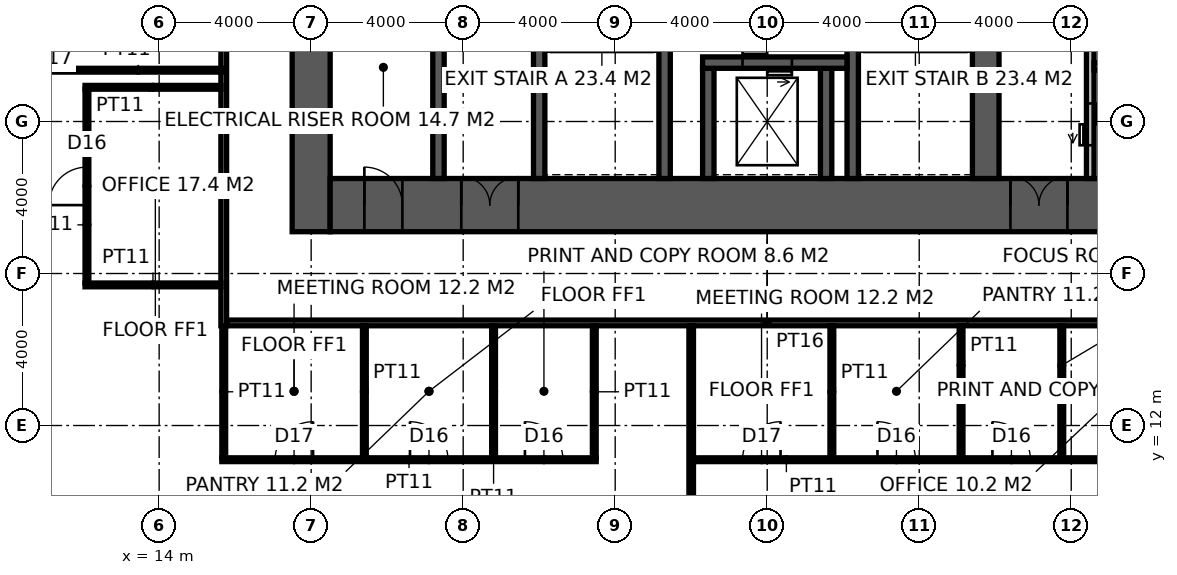
"""IFC4 building model, lengths in metres.
Left out: names, types, materials, properties, quantities, classifications, styles, units other than length and angle.
Written with IfcOpenShell. Run it as: python <this file> out.ifc"""

import sys

from ifc_helpers import new_model, si_unit, direction, frame, frame_2d, origin, place, context, subcontext, project, spatial, rectangle, extrude, element, fill, save


model = new_model("IFC4")
c1 = context("Model", 3, precision=1e-05, world=origin(), true_north=direction((0.0, 1.0)))
c2 = subcontext(c1, "Body", "Model", "MODEL_VIEW")
j1 = project(units=[si_unit("LENGTHUNIT", "METRE"), si_unit("PLANEANGLEUNIT", "RADIAN")], contexts=[c1])
p1 = place(None, origin())
s1 = spatial("IfcSite", under=j1, at=p1, CompositionType="ELEMENT")
p2 = place(p1, origin())
s2 = spatial("IfcBuilding", under=s1, at=p2, CompositionType="ELEMENT")
p3 = place(p2, frame((0.0, 0.0, 63.0)))
s3 = spatial("IfcBuildingStorey", under=s2, at=p3, CompositionType="ELEMENT", Elevation=63.0)
p4 = place(p3, frame((18.0, 17.1, -0.15), z_axis=(0.0, 0.0, 1.0), x_axis=(0.0, 1.0, 0.0)))
e1 = element("IfcWall", 1, at=p4, inside=s3, PredefinedType="SHEAR", context=c2, shape_type="SweptSolid", body=[
    extrude(rectangle(XDim=19.8, YDim=1.0, at=frame_2d((9.9, 0.0))), origin(), (0.0, 0.0, 1.0), 4.0),
])
p5 = place(p3, frame((18.5, 17.8, -0.15), z_axis=(0.0, 0.0, 1.0), x_axis=(1.0, 0.0, 0.0)))
e2 = element("IfcWall", 2, at=p5, inside=s3, PredefinedType="SHEAR", context=c2, shape_type="SweptSolid", body=[
    extrude(rectangle(XDim=23.7, YDim=1.4, at=frame_2d((11.85, 0.0))), origin(), (0.0, 0.0, 1.0), 4.0),
])
p6 = place(p5, frame((3.45, 0.0, 0.15)))
e3 = element("IfcOpeningElement", 3, at=p6, cuts=e2, PredefinedType="OPENING", context=c2, shape_type="SweptSolid", body=[
    extrude(rectangle(XDim=1.5, YDim=2.4, at=frame_2d((0.75, 1.2))), frame((0.0, 0.71, 0.0), z_axis=(0.0, -1.0, 0.0), x_axis=(1.0, 0.0, 0.0)), (0.0, 0.0, 1.0), 1.42),
])
p7 = place(p5, frame((17.9, 0.0, 0.15)))
e4 = element("IfcOpeningElement", 4, at=p7, cuts=e2, PredefinedType="OPENING", context=c2, shape_type="SweptSolid", body=[
    extrude(rectangle(XDim=1.5, YDim=2.4, at=frame_2d((0.75, 1.2))), frame((0.0, 0.71, 0.0), z_axis=(0.0, -1.0, 0.0), x_axis=(1.0, 0.0, 0.0)), (0.0, 0.0, 1.0), 1.42),
])
p8 = place(p5, frame((0.9, 0.0, 0.15)))
e5 = element("IfcOpeningElement", 5, at=p8, cuts=e2, PredefinedType="OPENING", context=c2, shape_type="SweptSolid", body=[
    extrude(rectangle(XDim=1.0, YDim=2.2, at=frame_2d((0.5, 1.1))), frame((0.0, 0.71, 0.0), z_axis=(0.0, -1.0, 0.0), x_axis=(1.0, 0.0, 0.0)), (0.0, 0.0, 1.0), 1.42),
])
p9 = place(p3, frame((35.75, 18.5, -0.15), z_axis=(0.0, 0.0, 1.0), x_axis=(0.0, 1.0, 0.0)))
e6 = element("IfcWall", 6, at=p9, inside=s3, PredefinedType="SHEAR", context=c2, shape_type="SweptSolid", body=[
    extrude(rectangle(XDim=17.0, YDim=0.7, at=frame_2d((8.5, 0.0))), origin(), (0.0, 0.0, 1.0), 4.0),
])
p10 = place(p9, frame((9.85, 0.0, 0.15)))
e7 = element("IfcOpeningElement", 7, at=p10, cuts=e6, PredefinedType="OPENING", context=c2, shape_type="SweptSolid", body=[
    extrude(rectangle(XDim=1.0, YDim=2.2, at=frame_2d((0.5, 1.1))), frame((0.0, 0.36, 0.0), z_axis=(0.0, -1.0, 0.0), x_axis=(1.0, 0.0, 0.0)), (0.0, 0.0, 1.0), 0.72),
])
p11 = place(p3, frame((24.0, 18.5, -0.15), z_axis=(0.0, 0.0, 1.0), x_axis=(0.0, 1.0, 0.0)))
e8 = element("IfcWall", 8, at=p11, inside=s3, PredefinedType="SHEAR", context=c2, shape_type="SweptSolid", body=[
    extrude(rectangle(XDim=17.0, YDim=0.3, at=frame_2d((8.5, 0.0))), origin(), (0.0, 0.0, 1.0), 4.0),
])
p12 = place(p11, frame((9.6, 0.0, 0.15)))
e9 = element("IfcOpeningElement", 9, at=p12, cuts=e8, PredefinedType="OPENING", context=c2, shape_type="SweptSolid", body=[
    extrude(rectangle(XDim=1.5, YDim=2.4, at=frame_2d((0.75, 1.2))), frame((0.0, 0.16, 0.0), z_axis=(0.0, -1.0, 0.0), x_axis=(1.0, 0.0, 0.0)), (0.0, 0.0, 1.0), 0.32),
])
p13 = place(p3, frame((27.3, 18.5, -0.15), z_axis=(0.0, 0.0, 1.0), x_axis=(0.0, 1.0, 0.0)))
e10 = element("IfcWall", 10, at=p13, inside=s3, PredefinedType="SHEAR", context=c2, shape_type="SweptSolid", body=[
    extrude(rectangle(XDim=7.9, YDim=0.3, at=frame_2d((3.95, 0.0))), origin(), (0.0, 0.0, 1.0), 4.0),
])
p14 = place(p13, frame((6.4, 0.0, 0.15)))
e11 = element("IfcOpeningElement", 11, at=p14, cuts=e10, PredefinedType="OPENING", context=c2, shape_type="SweptSolid", body=[
    extrude(rectangle(XDim=1.0, YDim=2.2, at=frame_2d((0.5, 1.1))), frame((0.0, 0.16, 0.0), z_axis=(0.0, -1.0, 0.0), x_axis=(1.0, 0.0, 0.0)), (0.0, 0.0, 1.0), 0.32),
])
p15 = place(p3, frame((32.25, 18.5, -0.15), z_axis=(0.0, 0.0, 1.0), x_axis=(0.0, 1.0, 0.0)))
e12 = element("IfcWall", 12, at=p15, inside=s3, PredefinedType="SHEAR", context=c2, shape_type="SweptSolid", body=[
    extrude(rectangle(XDim=7.9, YDim=0.3, at=frame_2d((3.95, 0.0))), origin(), (0.0, 0.0, 1.0), 4.0),
])
for number, where, z_axis, x_axis in (
    (13, (28.45, 18.5, -0.15), (0.0, 0.0, 1.0), (0.0, 1.0, 0.0)),
    (14, (31.55, 18.5, -0.15), (0.0, 0.0, 1.0), (0.0, 1.0, 0.0)),
):
    element("IfcWall", number, at=place(p3, frame(where, z_axis=z_axis, x_axis=x_axis)), inside=s3, PredefinedType="SHEAR", context=c2, shape_type="SweptSolid", body=[
        extrude(rectangle(XDim=2.9, YDim=0.3, at=frame_2d((1.45, 0.0))), origin(), (0.0, 0.0, 1.0), 4.0),
    ])
p16 = place(p3, frame((28.3, 21.55, -0.15), z_axis=(0.0, 0.0, 1.0), x_axis=(1.0, 0.0, 0.0)))
e15 = element("IfcWall", 15, at=p16, inside=s3, PredefinedType="SHEAR", context=c2, shape_type="SweptSolid", body=[
    extrude(rectangle(XDim=3.8, YDim=0.3, at=frame_2d((1.9, 0.0))), origin(), (0.0, 0.0, 1.0), 4.0),
])
p17 = place(p16, frame((1.05, 0.0, 0.15)))
e16 = element("IfcOpeningElement", 16, at=p17, cuts=e15, PredefinedType="OPENING", context=c2, shape_type="SweptSolid", body=[
    extrude(rectangle(XDim=1.3, YDim=2.4, at=frame_2d((0.65, 1.2))), frame((0.0, 0.16, 0.0), z_axis=(0.0, -1.0, 0.0), x_axis=(1.0, 0.0, 0.0)), (0.0, 0.0, 1.0), 0.32),
])
p18 = place(p3, frame((21.35, 18.5, -0.15), z_axis=(0.0, 0.0, 1.0), x_axis=(0.0, 1.0, 0.0)))
e17 = element("IfcWall", 17, at=p18, inside=s3, PredefinedType="SHEAR", context=c2, shape_type="SweptSolid", body=[
    extrude(rectangle(XDim=12.5, YDim=0.3, at=frame_2d((6.25, 0.0))), origin(), (0.0, 0.0, 1.0), 4.0),
])
p19 = place(p18, frame((8.15, 0.0, 0.15)))
e18 = element("IfcOpeningElement", 18, at=p19, cuts=e17, PredefinedType="OPENING", context=c2, shape_type="SweptSolid", body=[
    extrude(rectangle(XDim=1.0, YDim=2.2, at=frame_2d((0.5, 1.1))), frame((0.0, 0.16, 0.0), z_axis=(0.0, -1.0, 0.0), x_axis=(1.0, 0.0, 0.0)), (0.0, 0.0, 1.0), 0.32),
])
p20 = place(p3, frame((38.5, 18.5, -0.15), z_axis=(0.0, 0.0, 1.0), x_axis=(0.0, 1.0, 0.0)))
e19 = element("IfcWall", 19, at=p20, inside=s3, PredefinedType="SOLIDWALL", context=c2, shape_type="SweptSolid", body=[
    extrude(rectangle(XDim=11.5, YDim=0.2, at=frame_2d((5.75, 0.0))), origin(), (0.0, 0.0, 1.0), 4.0),
])
p21 = place(p20, frame((0.875, 0.0, 0.15)))
e20 = element("IfcOpeningElement", 20, at=p21, cuts=e19, PredefinedType="OPENING", context=c2, shape_type="SweptSolid", body=[
    extrude(rectangle(XDim=1.1, YDim=2.2, at=frame_2d((0.55, 1.1))), frame((0.0, 0.11, 0.0), z_axis=(0.0, -1.0, 0.0), x_axis=(1.0, 0.0, 0.0)), (0.0, 0.0, 1.0), 0.22),
])
p22 = place(p20, frame((3.825, 0.0, 0.15)))
e21 = element("IfcOpeningElement", 21, at=p22, cuts=e19, PredefinedType="OPENING", context=c2, shape_type="SweptSolid", body=[
    extrude(rectangle(XDim=1.1, YDim=2.2, at=frame_2d((0.55, 1.1))), frame((0.0, 0.11, 0.0), z_axis=(0.0, -1.0, 0.0), x_axis=(1.0, 0.0, 0.0)), (0.0, 0.0, 1.0), 0.22),
])
p23 = place(p20, frame((6.675, 0.0, 0.15)))
e22 = element("IfcOpeningElement", 22, at=p23, cuts=e19, PredefinedType="OPENING", context=c2, shape_type="SweptSolid", body=[
    extrude(rectangle(XDim=1.1, YDim=2.2, at=frame_2d((0.55, 1.1))), frame((0.0, 0.11, 0.0), z_axis=(0.0, -1.0, 0.0), x_axis=(1.0, 0.0, 0.0)), (0.0, 0.0, 1.0), 0.22),
])
p24 = place(p20, frame((9.575, 0.0, 0.15)))
e23 = element("IfcOpeningElement", 23, at=p24, cuts=e19, PredefinedType="OPENING", context=c2, shape_type="SweptSolid", body=[
    extrude(rectangle(XDim=1.1, YDim=2.2, at=frame_2d((0.55, 1.1))), frame((0.0, 0.11, 0.0), z_axis=(0.0, -1.0, 0.0), x_axis=(1.0, 0.0, 0.0)), (0.0, 0.0, 1.0), 0.22),
])
p25 = place(p3, frame((38.6, 21.45, -0.15), z_axis=(0.0, 0.0, 1.0), x_axis=(1.0, 0.0, 0.0)))
e24 = element("IfcWall", 24, at=p25, inside=s3, PredefinedType="SOLIDWALL", context=c2, shape_type="SweptSolid", body=[
    extrude(rectangle(XDim=2.9, YDim=0.2, at=frame_2d((1.45, 0.0))), origin(), (0.0, 0.0, 1.0), 4.0),
])
p26 = place(p3, frame((15.7, 14.625, 0.0), z_axis=(0.0, 0.0, 1.0), x_axis=(0.0, 1.0, 0.0)))
e25 = element("IfcWall", 25, at=p26, inside=s3, PredefinedType="PARTITIONING", context=c2, shape_type="SweptSolid", body=[
    extrude(rectangle(XDim=24.15, YDim=0.15, at=frame_2d((12.075, 0.0))), origin(), (0.0, 0.0, 1.0), 3.85),
])
p27 = place(p26, frame((7.475, 0.0, 0.0)))
e26 = element("IfcOpeningElement", 26, at=p27, cuts=e25, PredefinedType="OPENING", context=c2, shape_type="SweptSolid", body=[
    extrude(rectangle(XDim=1.8, YDim=2.4, at=frame_2d((0.9, 1.2))), frame((0.0, 0.085, 0.0), z_axis=(0.0, -1.0, 0.0), x_axis=(1.0, 0.0, 0.0)), (0.0, 0.0, 1.0), 0.17),
])
p28 = place(p26, frame((19.425, 0.0, 0.0)))
e27 = element("IfcOpeningElement", 27, at=p28, cuts=e25, PredefinedType="OPENING", context=c2, shape_type="SweptSolid", body=[
    extrude(rectangle(XDim=1.8, YDim=2.4, at=frame_2d((0.9, 1.2))), frame((0.0, 0.085, 0.0), z_axis=(0.0, -1.0, 0.0), x_axis=(1.0, 0.0, 0.0)), (0.0, 0.0, 1.0), 0.17),
])
p29 = place(p3, frame((15.775, 14.7, 0.0), z_axis=(0.0, 0.0, 1.0), x_axis=(1.0, 0.0, 0.0)))
e28 = element("IfcWall", 28, at=p29, inside=s3, PredefinedType="PARTITIONING", context=c2, shape_type="SweptSolid", body=[
    extrude(rectangle(XDim=28.45, YDim=0.15, at=frame_2d((14.225, 0.0))), origin(), (0.0, 0.0, 1.0), 3.85),
])
p30 = place(p3, frame((28.0, 0.3, 0.0), z_axis=(0.0, 0.0, 1.0), x_axis=(0.0, 1.0, 0.0)))
e29 = element("IfcWall", 29, at=p30, inside=s3, PredefinedType="PARTITIONING", context=c2, shape_type="SweptSolid", body=[
    extrude(rectangle(XDim=14.325, YDim=0.12, at=frame_2d((7.163, 0.0))), origin(), (0.0, 0.0, 1.0), 3.85),
])
p31 = place(p3, frame((15.65, 11.1, 0.0), z_axis=(0.0, 0.0, 1.0), x_axis=(1.0, 0.0, 0.0)))
e30 = element("IfcWall", 30, at=p31, inside=s3, PredefinedType="PARTITIONING", context=c2, shape_type="SweptSolid", body=[
    extrude(rectangle(XDim=9.85, YDim=0.1, at=frame_2d((4.925, 0.0))), origin(), (0.0, 0.0, 1.0), 3.85),
])
p32 = place(p31, frame((1.4, 0.0, 0.0)))
e31 = element("IfcOpeningElement", 31, at=p32, cuts=e30, PredefinedType="OPENING", context=c2, shape_type="SweptSolid", body=[
    extrude(rectangle(XDim=1.0, YDim=2.2, at=frame_2d((0.5, 1.1))), frame((0.0, 0.06, 0.0), z_axis=(0.0, -1.0, 0.0), x_axis=(1.0, 0.0, 0.0)), (0.0, 0.0, 1.0), 0.12),
])
p33 = place(p31, frame((4.95, 0.0, 0.0)))
e32 = element("IfcOpeningElement", 32, at=p33, cuts=e30, PredefinedType="OPENING", context=c2, shape_type="SweptSolid", body=[
    extrude(rectangle(XDim=1.0, YDim=2.2, at=frame_2d((0.5, 1.1))), frame((0.0, 0.06, 0.0), z_axis=(0.0, -1.0, 0.0), x_axis=(1.0, 0.0, 0.0)), (0.0, 0.0, 1.0), 0.12),
])
p34 = place(p31, frame((7.975, 0.0, 0.0)))
e33 = element("IfcOpeningElement", 33, at=p34, cuts=e30, PredefinedType="OPENING", context=c2, shape_type="SweptSolid", body=[
    extrude(rectangle(XDim=1.0, YDim=2.2, at=frame_2d((0.5, 1.1))), frame((0.0, 0.06, 0.0), z_axis=(0.0, -1.0, 0.0), x_axis=(1.0, 0.0, 0.0)), (0.0, 0.0, 1.0), 0.12),
])
p35 = place(p3, frame((28.061, 11.1, 0.0), z_axis=(0.0, 0.0, 1.0), x_axis=(1.0, 0.0, 0.0)))
e34 = element("IfcWall", 34, at=p35, inside=s3, PredefinedType="PARTITIONING", context=c2, shape_type="SweptSolid", body=[
    extrude(rectangle(XDim=16.289, YDim=0.1, at=frame_2d((8.145, 0.0))), origin(), (0.0, 0.0, 1.0), 3.85),
])
p36 = place(p35, frame((1.29, 0.0, 0.0)))
e35 = element("IfcOpeningElement", 35, at=p36, cuts=e34, PredefinedType="OPENING", context=c2, shape_type="SweptSolid", body=[
    extrude(rectangle(XDim=1.0, YDim=2.2, at=frame_2d((0.5, 1.1))), frame((0.0, 0.06, 0.0), z_axis=(0.0, -1.0, 0.0), x_axis=(1.0, 0.0, 0.0)), (0.0, 0.0, 1.0), 0.12),
])
p37 = place(p35, frame((4.84, 0.0, 0.0)))
e36 = element("IfcOpeningElement", 36, at=p37, cuts=e34, PredefinedType="OPENING", context=c2, shape_type="SweptSolid", body=[
    extrude(rectangle(XDim=1.0, YDim=2.2, at=frame_2d((0.5, 1.1))), frame((0.0, 0.06, 0.0), z_axis=(0.0, -1.0, 0.0), x_axis=(1.0, 0.0, 0.0)), (0.0, 0.0, 1.0), 0.12),
])
p38 = place(p35, frame((7.865, 0.0, 0.0)))
e37 = element("IfcOpeningElement", 37, at=p38, cuts=e34, PredefinedType="OPENING", context=c2, shape_type="SweptSolid", body=[
    extrude(rectangle(XDim=1.0, YDim=2.2, at=frame_2d((0.5, 1.1))), frame((0.0, 0.06, 0.0), z_axis=(0.0, -1.0, 0.0), x_axis=(1.0, 0.0, 0.0)), (0.0, 0.0, 1.0), 0.12),
])
p39 = place(p35, frame((10.74, 0.0, 0.0)))
e38 = element("IfcOpeningElement", 38, at=p39, cuts=e34, PredefinedType="OPENING", context=c2, shape_type="SweptSolid", body=[
    extrude(rectangle(XDim=1.0, YDim=2.2, at=frame_2d((0.5, 1.1))), frame((0.0, 0.06, 0.0), z_axis=(0.0, -1.0, 0.0), x_axis=(1.0, 0.0, 0.0)), (0.0, 0.0, 1.0), 0.12),
])
p40 = place(p35, frame((14.014, 0.0, 0.0)))
e39 = element("IfcOpeningElement", 39, at=p40, cuts=e34, PredefinedType="OPENING", context=c2, shape_type="SweptSolid", body=[
    extrude(rectangle(XDim=1.0, YDim=2.2, at=frame_2d((0.5, 1.1))), frame((0.0, 0.06, 0.0), z_axis=(0.0, -1.0, 0.0), x_axis=(1.0, 0.0, 0.0)), (0.0, 0.0, 1.0), 0.12),
])
for number, where, z_axis, x_axis in (
    (40, (12.05, 15.7, 0.0), (0.0, 0.0, 1.0), (1.0, 0.0, 0.0)),
    (41, (12.05, 20.9, 0.0), (0.0, 0.0, 1.0), (1.0, 0.0, 0.0)),
):
    element("IfcWall", number, at=place(p3, frame(where, z_axis=z_axis, x_axis=x_axis)), inside=s3, PredefinedType="PARTITIONING", context=c2, shape_type="SweptSolid", body=[
        extrude(rectangle(XDim=3.575, YDim=0.1, at=frame_2d((1.788, 0.0))), origin(), (0.0, 0.0, 1.0), 3.85),
    ])
p41 = place(p3, frame((12.1, 15.75, 0.0), z_axis=(0.0, 0.0, 1.0), x_axis=(0.0, 1.0, 0.0)))
e42 = element("IfcWall", 42, at=p41, inside=s3, PredefinedType="PARTITIONING", context=c2, shape_type="SweptSolid", body=[
    extrude(rectangle(XDim=5.1, YDim=0.1, at=frame_2d((2.55, 0.0))), origin(), (0.0, 0.0, 1.0), 3.85),
])
p42 = place(p41, frame((2.05, 0.0, 0.0)))
e43 = element("IfcOpeningElement", 43, at=p42, cuts=e42, PredefinedType="OPENING", context=c2, shape_type="SweptSolid", body=[
    extrude(rectangle(XDim=1.0, YDim=2.2, at=frame_2d((0.5, 1.1))), frame((0.0, 0.06, 0.0), z_axis=(0.0, -1.0, 0.0), x_axis=(1.0, 0.0, 0.0)), (0.0, 0.0, 1.0), 0.12),
])
for number, where, z_axis, x_axis in (
    (44, (15.7, 11.15, 0.0), (0.0, 0.0, 1.0), (0.0, 1.0, 0.0)),
    (45, (19.4, 11.15, 0.0), (0.0, 0.0, 1.0), (0.0, 1.0, 0.0)),
    (46, (22.8, 11.15, 0.0), (0.0, 0.0, 1.0), (0.0, 1.0, 0.0)),
    (47, (25.45, 11.15, 0.0), (0.0, 0.0, 1.0), (0.0, 1.0, 0.0)),
    (48, (31.701, 11.15, 0.0), (0.0, 0.0, 1.0), (0.0, 1.0, 0.0)),
    (49, (35.101, 11.15, 0.0), (0.0, 0.0, 1.0), (0.0, 1.0, 0.0)),
    (50, (37.751, 11.15, 0.0), (0.0, 0.0, 1.0), (0.0, 1.0, 0.0)),
):
    element("IfcWall", number, at=place(p3, frame(where, z_axis=z_axis, x_axis=x_axis)), inside=s3, PredefinedType="PARTITIONING", context=c2, shape_type="SweptSolid", body=[
        extrude(rectangle(XDim=3.475, YDim=0.1, at=frame_2d((1.738, 0.0))), origin(), (0.0, 0.0, 1.0), 3.85),
    ])
p43 = place(p3, frame((11.2, 26.45, 0.0), z_axis=(0.0, 0.0, 1.0), x_axis=(0.0, -1.0, 0.0)))
e51 = element("IfcWall", 51, at=p43, inside=s3, PredefinedType="PARTITIONING", context=c2, shape_type="SweptSolid", body=[
    extrude(rectangle(XDim=5.1, YDim=0.1, at=frame_2d((2.55, 0.0))), origin(), (0.0, 0.0, 1.0), 3.85),
])
p44 = place(p43, frame((3.2, 0.0, 0.0)))
e52 = element("IfcOpeningElement", 52, at=p44, cuts=e51, PredefinedType="OPENING", context=c2, shape_type="SweptSolid", body=[
    extrude(rectangle(XDim=1.0, YDim=2.2, at=frame_2d((0.5, 1.1))), frame((0.0, 0.06, 0.0), z_axis=(0.0, -1.0, 0.0), x_axis=(1.0, 0.0, 0.0)), (0.0, 0.0, 1.0), 0.12),
])
p45 = place(p3, frame((11.2, 21.35, 0.0), z_axis=(0.0, 0.0, 1.0), x_axis=(1.0, 0.0, 0.0)))
e53 = element("IfcWall", 53, at=p45, inside=s3, PredefinedType="PARTITIONING", context=c2, shape_type="SweptSolid", body=[
    extrude(rectangle(XDim=4.5, YDim=0.1, at=frame_2d((2.25, 0.0))), origin(), (0.0, 0.0, 1.0), 3.85),
])
p46 = place(p6, origin())
e54 = element("IfcDoor", 54, at=p46, inside=s3, OperationType="DOUBLE_DOOR_DOUBLE_SWING", PredefinedType="DOOR", context=c2, shape_type="SweptSolid", body=[
    extrude(rectangle(XDim=1.5, YDim=2.4, at=frame_2d((0.75, 1.2))), frame((0.0, 0.025, 0.0), z_axis=(0.0, -1.0, 0.0), x_axis=(1.0, 0.0, 0.0)), (0.0, 0.0, 1.0), 0.05),
])
fill(e3, e54)
p47 = place(p7, origin())
e55 = element("IfcDoor", 55, at=p47, inside=s3, OperationType="DOUBLE_DOOR_DOUBLE_SWING", PredefinedType="DOOR", context=c2, shape_type="SweptSolid", body=[
    extrude(rectangle(XDim=1.5, YDim=2.4, at=frame_2d((0.75, 1.2))), frame((0.0, 0.025, 0.0), z_axis=(0.0, -1.0, 0.0), x_axis=(1.0, 0.0, 0.0)), (0.0, 0.0, 1.0), 0.05),
])
fill(e4, e55)
p48 = place(p8, origin())
e56 = element("IfcDoor", 56, at=p48, inside=s3, OperationType="SINGLE_SWING_LEFT", PredefinedType="DOOR", context=c2, shape_type="SweptSolid", body=[
    extrude(rectangle(XDim=1.0, YDim=2.2, at=frame_2d((0.5, 1.1))), frame((0.0, 0.025, 0.0), z_axis=(0.0, -1.0, 0.0), x_axis=(1.0, 0.0, 0.0)), (0.0, 0.0, 1.0), 0.05),
])
fill(e5, e56)
p49 = place(p32, origin())
e57 = element("IfcDoor", 57, at=p49, inside=s3, OperationType="SINGLE_SWING_RIGHT", PredefinedType="DOOR", context=c2, shape_type="SweptSolid", body=[
    extrude(rectangle(XDim=1.0, YDim=2.2, at=frame_2d((0.5, 1.1))), frame((0.0, 0.025, 0.0), z_axis=(0.0, -1.0, 0.0), x_axis=(1.0, 0.0, 0.0)), (0.0, 0.0, 1.0), 0.05),
])
fill(e31, e57)
p50 = place(p33, origin())
e58 = element("IfcDoor", 58, at=p50, inside=s3, OperationType="SINGLE_SWING_LEFT", PredefinedType="DOOR", context=c2, shape_type="SweptSolid", body=[
    extrude(rectangle(XDim=1.0, YDim=2.2, at=frame_2d((0.5, 1.1))), frame((0.0, 0.025, 0.0), z_axis=(0.0, -1.0, 0.0), x_axis=(1.0, 0.0, 0.0)), (0.0, 0.0, 1.0), 0.05),
])
fill(e32, e58)
p51 = place(p34, origin())
e59 = element("IfcDoor", 59, at=p51, inside=s3, OperationType="SINGLE_SWING_LEFT", PredefinedType="DOOR", context=c2, shape_type="SweptSolid", body=[
    extrude(rectangle(XDim=1.0, YDim=2.2, at=frame_2d((0.5, 1.1))), frame((0.0, 0.025, 0.0), z_axis=(0.0, -1.0, 0.0), x_axis=(1.0, 0.0, 0.0)), (0.0, 0.0, 1.0), 0.05),
])
fill(e33, e59)
p52 = place(p42, origin())
e60 = element("IfcDoor", 60, at=p52, inside=s3, OperationType="SINGLE_SWING_LEFT", PredefinedType="DOOR", context=c2, shape_type="SweptSolid", body=[
    extrude(rectangle(XDim=1.0, YDim=2.2, at=frame_2d((0.5, 1.1))), frame((0.0, 0.025, 0.0), z_axis=(0.0, -1.0, 0.0), x_axis=(1.0, 0.0, 0.0)), (0.0, 0.0, 1.0), 0.05),
])
fill(e43, e60)
p53 = place(p36, origin())
e61 = element("IfcDoor", 61, at=p53, inside=s3, OperationType="SINGLE_SWING_RIGHT", PredefinedType="DOOR", context=c2, shape_type="SweptSolid", body=[
    extrude(rectangle(XDim=1.0, YDim=2.2, at=frame_2d((0.5, 1.1))), frame((0.0, 0.025, 0.0), z_axis=(0.0, -1.0, 0.0), x_axis=(1.0, 0.0, 0.0)), (0.0, 0.0, 1.0), 0.05),
])
fill(e35, e61)
p54 = place(p37, origin())
e62 = element("IfcDoor", 62, at=p54, inside=s3, OperationType="SINGLE_SWING_LEFT", PredefinedType="DOOR", context=c2, shape_type="SweptSolid", body=[
    extrude(rectangle(XDim=1.0, YDim=2.2, at=frame_2d((0.5, 1.1))), frame((0.0, 0.025, 0.0), z_axis=(0.0, -1.0, 0.0), x_axis=(1.0, 0.0, 0.0)), (0.0, 0.0, 1.0), 0.05),
])
fill(e36, e62)
p55 = place(p38, origin())
e63 = element("IfcDoor", 63, at=p55, inside=s3, OperationType="SINGLE_SWING_LEFT", PredefinedType="DOOR", context=c2, shape_type="SweptSolid", body=[
    extrude(rectangle(XDim=1.0, YDim=2.2, at=frame_2d((0.5, 1.1))), frame((0.0, 0.025, 0.0), z_axis=(0.0, -1.0, 0.0), x_axis=(1.0, 0.0, 0.0)), (0.0, 0.0, 1.0), 0.05),
])
fill(e37, e63)
p56 = place(p17, origin())
e64 = element("IfcDoor", 64, at=p56, inside=s3, OperationType="DOUBLE_DOOR_SLIDING", PredefinedType="DOOR", context=c2, shape_type="SweptSolid", body=[
    extrude(rectangle(XDim=1.3, YDim=2.4, at=frame_2d((0.65, 1.2))), frame((0.0, 0.025, 0.0), z_axis=(0.0, -1.0, 0.0), x_axis=(1.0, 0.0, 0.0)), (0.0, 0.0, 1.0), 0.05),
])
fill(e16, e64)
p57 = place(p21, origin())
e65 = element("IfcDoor", 65, at=p57, inside=s3, OperationType="DOUBLE_DOOR_SLIDING", PredefinedType="DOOR", context=c2, shape_type="SweptSolid", body=[
    extrude(rectangle(XDim=1.1, YDim=2.2, at=frame_2d((0.55, 1.1))), frame((0.0, 0.025, 0.0), z_axis=(0.0, -1.0, 0.0), x_axis=(1.0, 0.0, 0.0)), (0.0, 0.0, 1.0), 0.05),
])
fill(e20, e65)
save(model, sys.argv[1])
